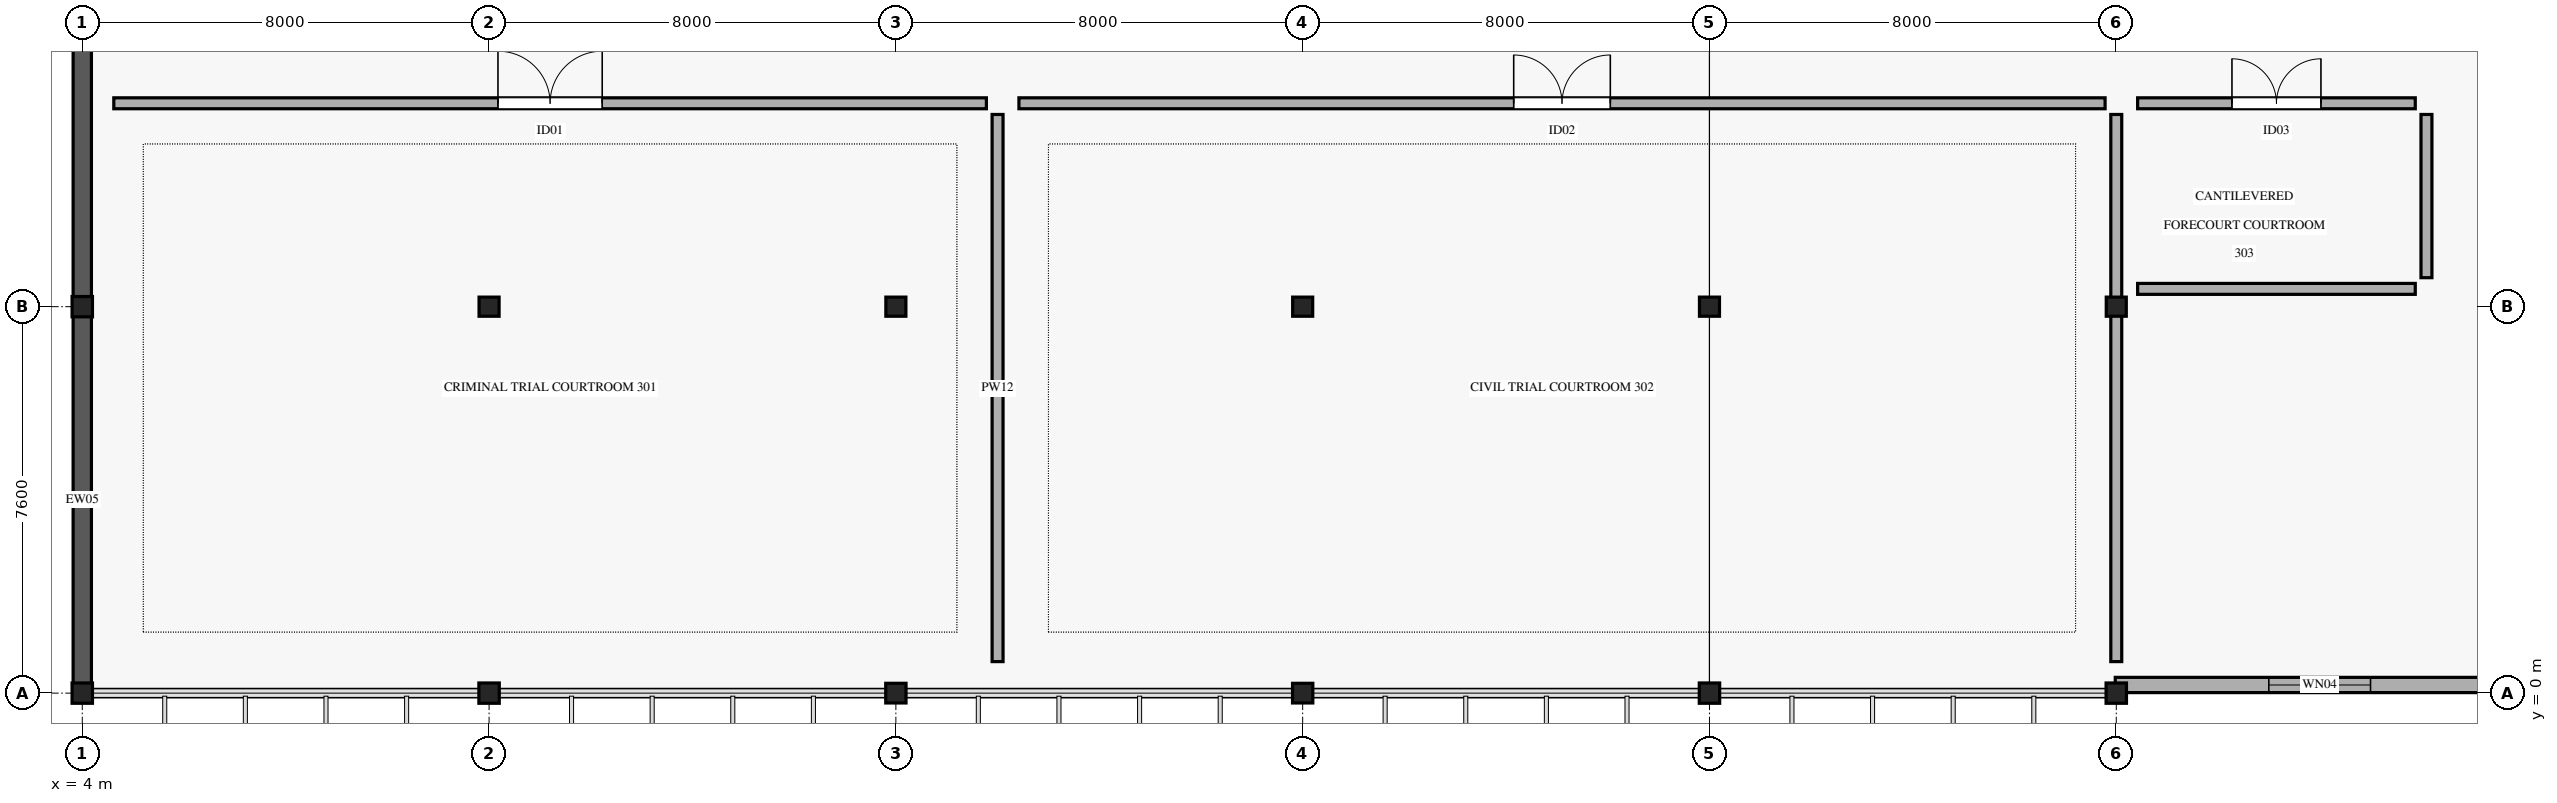
"""IFC4 building model, lengths in metres.
Left out: names, types, materials, properties, quantities, classifications, styles, units other than length and angle.
Written with IfcOpenShell. Run it as: python <this file> out.ifc"""

import sys

from ifc_helpers import new_model, si_unit, direction, frame, frame_2d, origin, origin_2d, place, context, subcontext, project, spatial, rectangle, i_section, extrude, element, fill, save


model = new_model("IFC4")
c1 = context("Model", 3, precision=1e-05, world=origin(), true_north=direction((0.0, 1.0)))
c2 = subcontext(c1, "Body", "Model", "MODEL_VIEW")
j1 = project(units=[si_unit("LENGTHUNIT", "METRE"), si_unit("PLANEANGLEUNIT", "RADIAN")], contexts=[c1])
p1 = place(None, origin())
s1 = spatial("IfcSite", under=j1, at=p1, CompositionType="ELEMENT")
p2 = place(p1, origin())
s2 = spatial("IfcBuilding", under=s1, at=p2, CompositionType="ELEMENT")
p3 = place(p2, frame((0.0, 0.0, 15.6)))
s3 = spatial("IfcBuildingStorey", under=s2, at=p3, CompositionType="ELEMENT", Elevation=15.6)
for number, where, z_axis, x_axis in (
    (1, (4.0, 0.0, 0.0), (0.0, 0.0, 1.0), (1.0, 0.0, 0.0)),
    (2, (4.0, 7.6, 0.0), (0.0, 0.0, 1.0), (1.0, 0.0, 0.0)),
    (3, (12.0, 0.0, 0.0), (0.0, 0.0, 1.0), (1.0, 0.0, 0.0)),
):
    element("IfcColumn", number, at=place(p3, frame(where, z_axis=z_axis, x_axis=x_axis)), inside=s3, PredefinedType="COLUMN", context=c2, shape_type="SweptSolid", body=[
        extrude(i_section(OverallWidth=0.401, OverallDepth=0.399, WebThickness=0.025, FlangeThickness=0.04, FilletRadius=0.015, at=origin_2d()), origin(), (0.0, 0.0, 1.0), 4.59),
    ])
p4 = place(p3, frame((12.0, 7.6, 0.0), z_axis=(0.0, 0.0, 1.0), x_axis=(1.0, 0.0, 0.0)))
e4 = element("IfcColumn", 4, at=p4, inside=s3, PredefinedType="COLUMN", context=c2, shape_type="SweptSolid", body=[
    extrude(i_section(OverallWidth=0.394, OverallDepth=0.376, WebThickness=0.017, FlangeThickness=0.028, FilletRadius=0.015, at=origin_2d()), origin(), (0.0, 0.0, 1.0), 4.59),
])
p5 = place(p3, frame((20.0, 0.0, 0.0), z_axis=(0.0, 0.0, 1.0), x_axis=(1.0, 0.0, 0.0)))
e5 = element("IfcColumn", 5, at=p5, inside=s3, PredefinedType="COLUMN", context=c2, shape_type="SweptSolid", body=[
    extrude(i_section(OverallWidth=0.399, OverallDepth=0.387, WebThickness=0.021, FlangeThickness=0.033, FilletRadius=0.015, at=origin_2d()), origin(), (0.0, 0.0, 1.0), 4.59),
])
p6 = place(p3, frame((20.0, 7.6, 0.0), z_axis=(0.0, 0.0, 1.0), x_axis=(1.0, 0.0, 0.0)))
e6 = element("IfcColumn", 6, at=p6, inside=s3, PredefinedType="COLUMN", context=c2, shape_type="SweptSolid", body=[
    extrude(i_section(OverallWidth=0.394, OverallDepth=0.376, WebThickness=0.017, FlangeThickness=0.028, FilletRadius=0.015, at=origin_2d()), origin(), (0.0, 0.0, 1.0), 4.59),
])
p7 = place(p3, frame((28.0, 0.0, 0.0), z_axis=(0.0, 0.0, 1.0), x_axis=(1.0, 0.0, 0.0)))
e7 = element("IfcColumn", 7, at=p7, inside=s3, PredefinedType="COLUMN", context=c2, shape_type="SweptSolid", body=[
    extrude(i_section(OverallWidth=0.399, OverallDepth=0.387, WebThickness=0.021, FlangeThickness=0.033, FilletRadius=0.015, at=origin_2d()), origin(), (0.0, 0.0, 1.0), 4.59),
])
p8 = place(p3, frame((28.0, 7.6, 0.0), z_axis=(0.0, 0.0, 1.0), x_axis=(1.0, 0.0, 0.0)))
e8 = element("IfcColumn", 8, at=p8, inside=s3, PredefinedType="COLUMN", context=c2, shape_type="SweptSolid", body=[
    extrude(i_section(OverallWidth=0.394, OverallDepth=0.376, WebThickness=0.017, FlangeThickness=0.028, FilletRadius=0.015, at=origin_2d()), origin(), (0.0, 0.0, 1.0), 4.59),
])
p9 = place(p3, frame((36.0, 0.0, 0.0), z_axis=(0.0, 0.0, 1.0), x_axis=(1.0, 0.0, 0.0)))
e9 = element("IfcColumn", 9, at=p9, inside=s3, PredefinedType="COLUMN", context=c2, shape_type="SweptSolid", body=[
    extrude(i_section(OverallWidth=0.401, OverallDepth=0.399, WebThickness=0.025, FlangeThickness=0.04, FilletRadius=0.015, at=origin_2d()), origin(), (0.0, 0.0, 1.0), 4.59),
])
p10 = place(p3, frame((36.0, 7.6, 0.0), z_axis=(0.0, 0.0, 1.0), x_axis=(1.0, 0.0, 0.0)))
e10 = element("IfcColumn", 10, at=p10, inside=s3, PredefinedType="COLUMN", context=c2, shape_type="SweptSolid", body=[
    extrude(i_section(OverallWidth=0.394, OverallDepth=0.376, WebThickness=0.017, FlangeThickness=0.028, FilletRadius=0.015, at=origin_2d()), origin(), (0.0, 0.0, 1.0), 4.59),
])
p11 = place(p3, frame((44.0, 0.0, 0.0), z_axis=(0.0, 0.0, 1.0), x_axis=(1.0, 0.0, 0.0)))
e11 = element("IfcColumn", 11, at=p11, inside=s3, PredefinedType="COLUMN", context=c2, shape_type="SweptSolid", body=[
    extrude(i_section(OverallWidth=0.401, OverallDepth=0.399, WebThickness=0.025, FlangeThickness=0.04, FilletRadius=0.015, at=origin_2d()), origin(), (0.0, 0.0, 1.0), 4.59),
])
p12 = place(p3, frame((44.0, 7.6, 0.0), z_axis=(0.0, 0.0, 1.0), x_axis=(1.0, 0.0, 0.0)))
e12 = element("IfcColumn", 12, at=p12, inside=s3, PredefinedType="COLUMN", context=c2, shape_type="SweptSolid", body=[
    extrude(i_section(OverallWidth=0.394, OverallDepth=0.376, WebThickness=0.017, FlangeThickness=0.028, FilletRadius=0.015, at=origin_2d()), origin(), (0.0, 0.0, 1.0), 4.59),
])
p13 = place(p3, frame((4.0, -0.02, 0.0), z_axis=(0.0, 0.0, 1.0), x_axis=(0.0, 1.0, 0.0)))
e13 = element("IfcWall", 13, at=p13, inside=s3, PredefinedType="STANDARD", context=c2, shape_type="SweptSolid", body=[
    extrude(rectangle(XDim=7.64, YDim=0.36, at=frame_2d((3.82, 0.0))), origin(), (0.0, 0.0, 1.0), 4.6),
])
p14 = place(p3, frame((4.0, 7.58, 0.0), z_axis=(0.0, 0.0, 1.0), x_axis=(0.0, 1.0, 0.0)))
e14 = element("IfcWall", 14, at=p14, inside=s3, PredefinedType="STANDARD", context=c2, shape_type="SweptSolid", body=[
    extrude(rectangle(XDim=7.64, YDim=0.36, at=frame_2d((3.82, 0.0))), origin(), (0.0, 0.0, 1.0), 4.6),
])
p15 = place(p3, frame((52.02, 0.16, 0.0), z_axis=(0.0, 0.0, 1.0), x_axis=(-1.0, 0.0, 0.0)))
e15 = element("IfcWall", 15, at=p15, inside=s3, PredefinedType="STANDARD", context=c2, shape_type="SweptSolid", body=[
    extrude(rectangle(XDim=8.04, YDim=0.3, at=frame_2d((4.02, 0.0))), origin(), (0.0, 0.0, 1.0), 3.46),
])
p16 = place(p15, frame((3.02, 0.0, 0.75)))
e16 = element("IfcOpeningElement", 16, at=p16, cuts=e15, PredefinedType="OPENING", context=c2, shape_type="SweptSolid", body=[
    extrude(rectangle(XDim=2.0, YDim=2.0, at=frame_2d((1.0, 1.0))), frame((0.0, 0.16, 0.0), z_axis=(0.0, -1.0, 0.0), x_axis=(1.0, 0.0, 0.0)), (0.0, 0.0, 1.0), 0.32),
])
p17 = place(p3, frame((4.62, 11.6, 0.0), z_axis=(0.0, 0.0, 1.0), x_axis=(1.0, 0.0, 0.0)))
e17 = element("IfcWall", 17, at=p17, inside=s3, PredefinedType="PARTITIONING", context=c2, shape_type="SweptSolid", body=[
    extrude(rectangle(XDim=17.16, YDim=0.215, at=frame_2d((8.58, 0.0))), origin(), (0.0, 0.0, 1.0), 3.45),
])
p18 = place(p17, frame((7.555, 0.0, 0.0)))
e18 = element("IfcOpeningElement", 18, at=p18, cuts=e17, PredefinedType="OPENING", context=c2, shape_type="SweptSolid", body=[
    extrude(rectangle(XDim=2.05, YDim=2.45, at=frame_2d((1.025, 1.225))), frame((0.0, 0.117, 0.0), z_axis=(0.0, -1.0, 0.0), x_axis=(1.0, 0.0, 0.0)), (0.0, 0.0, 1.0), 0.235),
])
p19 = place(p3, frame((22.0, 0.62, 0.0), z_axis=(0.0, 0.0, 1.0), x_axis=(0.0, 1.0, 0.0)))
e19 = element("IfcWall", 19, at=p19, inside=s3, PredefinedType="PARTITIONING", context=c2, shape_type="SweptSolid", body=[
    extrude(rectangle(XDim=10.76, YDim=0.215, at=frame_2d((5.38, 0.0))), origin(), (0.0, 0.0, 1.0), 3.45),
])
p20 = place(p3, frame((22.42, 11.6, 0.0), z_axis=(0.0, 0.0, 1.0), x_axis=(1.0, 0.0, 0.0)))
e20 = element("IfcWall", 20, at=p20, inside=s3, PredefinedType="PARTITIONING", context=c2, shape_type="SweptSolid", body=[
    extrude(rectangle(XDim=21.36, YDim=0.215, at=frame_2d((10.68, 0.0))), origin(), (0.0, 0.0, 1.0), 3.45),
])
p21 = place(p20, frame((9.73, 0.0, 0.0)))
e21 = element("IfcOpeningElement", 21, at=p21, cuts=e20, PredefinedType="OPENING", context=c2, shape_type="SweptSolid", body=[
    extrude(rectangle(XDim=1.9, YDim=2.4, at=frame_2d((0.95, 1.2))), frame((0.0, 0.117, 0.0), z_axis=(0.0, -1.0, 0.0), x_axis=(1.0, 0.0, 0.0)), (0.0, 0.0, 1.0), 0.235),
])
p22 = place(p3, frame((44.0, 0.62, 0.0), z_axis=(0.0, 0.0, 1.0), x_axis=(0.0, 1.0, 0.0)))
e22 = element("IfcWall", 22, at=p22, inside=s3, PredefinedType="PARTITIONING", context=c2, shape_type="SweptSolid", body=[
    extrude(rectangle(XDim=10.76, YDim=0.215, at=frame_2d((5.38, 0.0))), origin(), (0.0, 0.0, 1.0), 3.45),
])
p23 = place(p3, frame((44.42, 11.6, 0.0), z_axis=(0.0, 0.0, 1.0), x_axis=(1.0, 0.0, 0.0)))
e23 = element("IfcWall", 23, at=p23, inside=s3, PredefinedType="PARTITIONING", context=c2, shape_type="SweptSolid", body=[
    extrude(rectangle(XDim=5.46, YDim=0.215, at=frame_2d((2.73, 0.0))), origin(), (0.0, 0.0, 1.0), 3.45),
])
p24 = place(p23, frame((1.855, 0.0, 0.0)))
e24 = element("IfcOpeningElement", 24, at=p24, cuts=e23, PredefinedType="OPENING", context=c2, shape_type="SweptSolid", body=[
    extrude(rectangle(XDim=1.75, YDim=2.35, at=frame_2d((0.875, 1.175))), frame((0.0, 0.117, 0.0), z_axis=(0.0, -1.0, 0.0), x_axis=(1.0, 0.0, 0.0)), (0.0, 0.0, 1.0), 0.235),
])
p25 = place(p3, frame((50.1, 8.17, 0.0), z_axis=(0.0, 0.0, 1.0), x_axis=(0.0, 1.0, 0.0)))
e25 = element("IfcWall", 25, at=p25, inside=s3, PredefinedType="PARTITIONING", context=c2, shape_type="SweptSolid", body=[
    extrude(rectangle(XDim=3.21, YDim=0.215, at=frame_2d((1.605, 0.0))), origin(), (0.0, 0.0, 1.0), 3.45),
])
p26 = place(p3, frame((44.42, 7.95, 0.0), z_axis=(0.0, 0.0, 1.0), x_axis=(1.0, 0.0, 0.0)))
e26 = element("IfcWall", 26, at=p26, inside=s3, PredefinedType="PARTITIONING", context=c2, shape_type="SweptSolid", body=[
    extrude(rectangle(XDim=5.46, YDim=0.215, at=frame_2d((2.73, 0.0))), origin(), (0.0, 0.0, 1.0), 3.45),
])
p27 = place(p16, origin())
e27 = element("IfcWindow", 27, at=p27, inside=s3, PartitioningType="SINGLE_PANEL", PredefinedType="WINDOW", context=c2, shape_type="SweptSolid", body=[
    extrude(rectangle(XDim=2.0, YDim=2.0, at=frame_2d((1.0, 1.0))), frame((0.0, 0.03, 0.0), z_axis=(0.0, -1.0, 0.0), x_axis=(1.0, 0.0, 0.0)), (0.0, 0.0, 1.0), 0.06),
])
fill(e16, e27)
p28 = place(p18, origin())
e28 = element("IfcDoor", 28, at=p28, inside=s3, OperationType="DOUBLE_DOOR_SINGLE_SWING", PredefinedType="DOOR", context=c2, shape_type="SweptSolid", body=[
    extrude(rectangle(XDim=2.05, YDim=2.45, at=frame_2d((1.025, 1.225))), frame((0.0, 0.025, 0.0), z_axis=(0.0, -1.0, 0.0), x_axis=(1.0, 0.0, 0.0)), (0.0, 0.0, 1.0), 0.05),
])
fill(e18, e28)
p29 = place(p21, origin())
e29 = element("IfcDoor", 29, at=p29, inside=s3, OperationType="DOUBLE_DOOR_SINGLE_SWING", PredefinedType="DOOR", context=c2, shape_type="SweptSolid", body=[
    extrude(rectangle(XDim=1.9, YDim=2.4, at=frame_2d((0.95, 1.2))), frame((0.0, 0.025, 0.0), z_axis=(0.0, -1.0, 0.0), x_axis=(1.0, 0.0, 0.0)), (0.0, 0.0, 1.0), 0.05),
])
fill(e21, e29)
p30 = place(p24, origin())
e30 = element("IfcDoor", 30, at=p30, inside=s3, OperationType="DOUBLE_DOOR_SINGLE_SWING", PredefinedType="DOOR", context=c2, shape_type="SweptSolid", body=[
    extrude(rectangle(XDim=1.75, YDim=2.35, at=frame_2d((0.875, 1.175))), frame((0.0, 0.025, 0.0), z_axis=(0.0, -1.0, 0.0), x_axis=(1.0, 0.0, 0.0)), (0.0, 0.0, 1.0), 0.05),
])
fill(e24, e30)
save(model, sys.argv[1])
